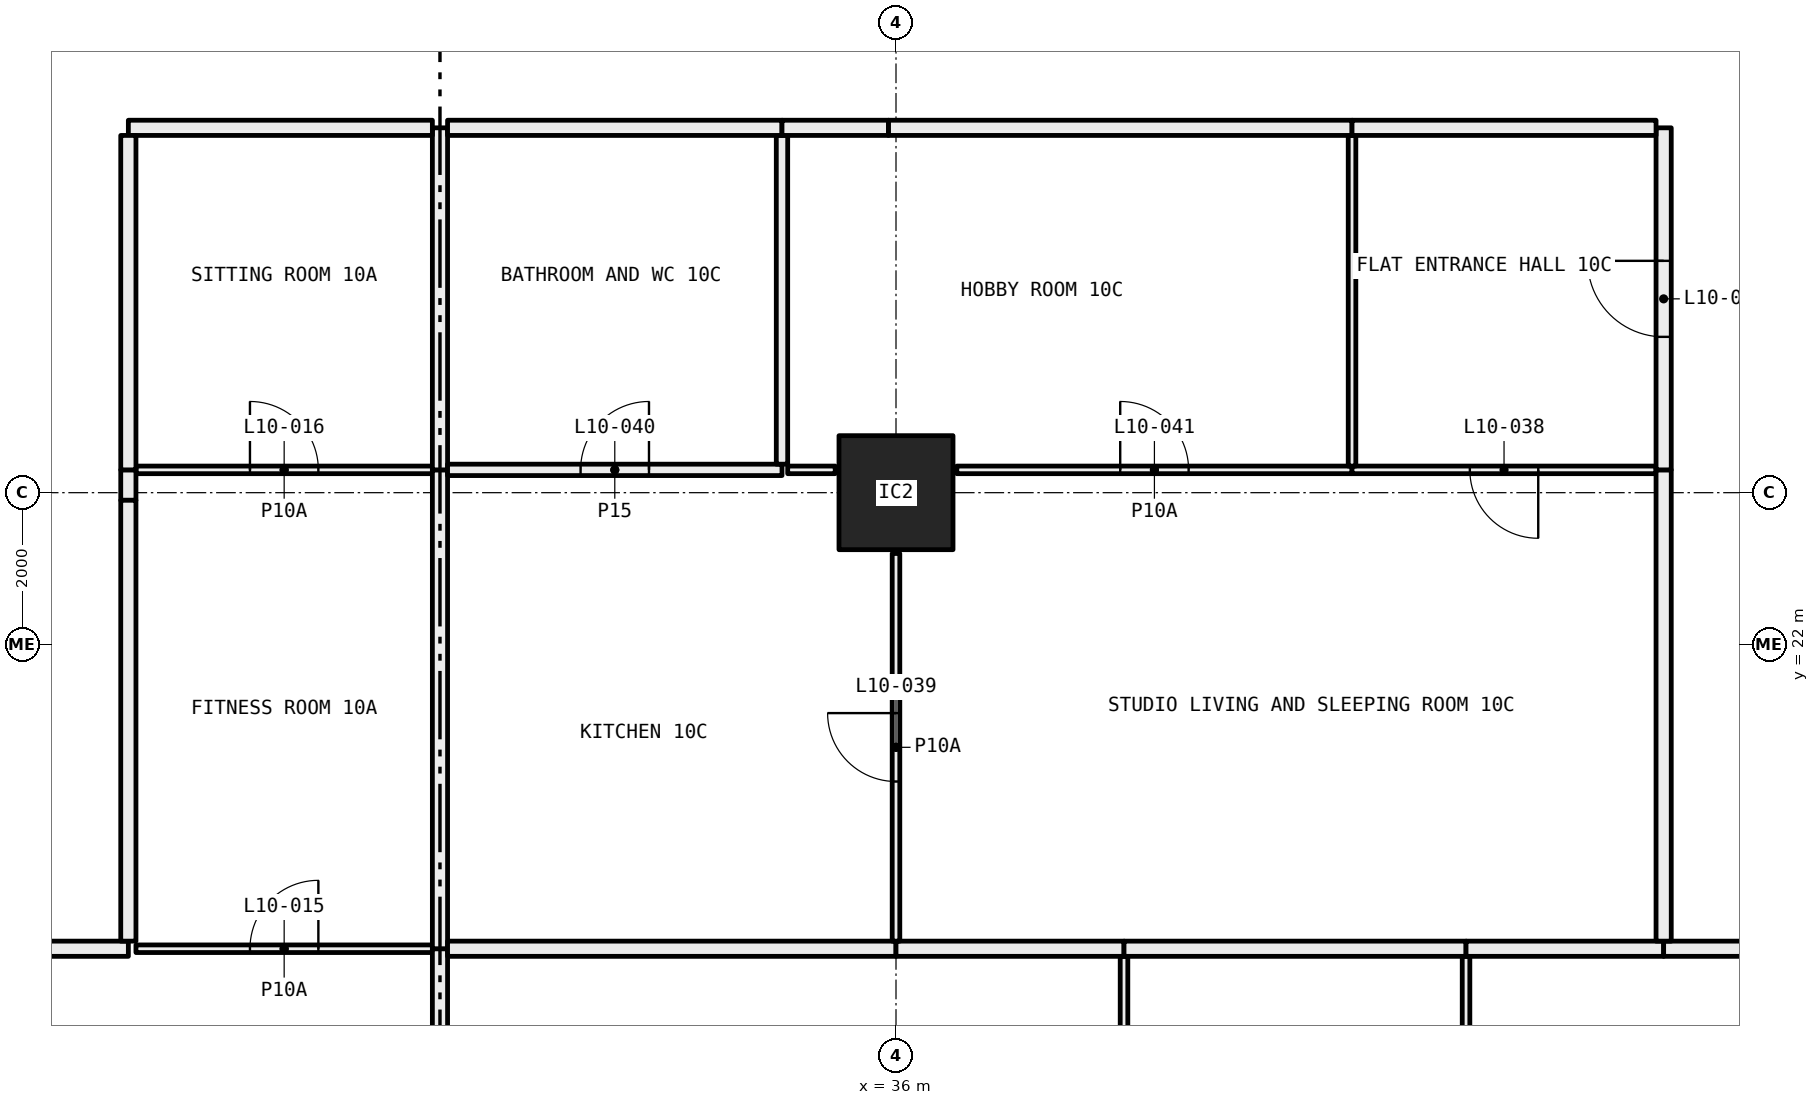
"""IFC4 building model, lengths in metres.
Left out: names, types, materials, properties, quantities, classifications, styles, units other than length and angle.
Written with IfcOpenShell. Run it as: python <this file> out.ifc"""

import sys

from ifc_helpers import new_model, si_unit, direction, frame, frame_2d, origin, origin_2d, place, context, subcontext, project, spatial, rectangle, hollow_rectangle, extrude, element, fill, save


model = new_model("IFC4")
c1 = context("Model", 3, precision=1e-05, world=origin(), true_north=direction((0.0, 1.0)))
c2 = subcontext(c1, "Body", "Model", "MODEL_VIEW")
j1 = project(units=[si_unit("LENGTHUNIT", "METRE"), si_unit("PLANEANGLEUNIT", "RADIAN")], contexts=[c1])
p1 = place(None, origin())
s1 = spatial("IfcSite", under=j1, at=p1, CompositionType="ELEMENT")
p2 = place(p1, origin())
s2 = spatial("IfcBuilding", under=s1, at=p2, CompositionType="ELEMENT")
p3 = place(p2, frame((0.0, 0.0, 47.25)))
s3 = spatial("IfcBuildingStorey", under=s2, at=p3, CompositionType="ELEMENT", Elevation=47.25)
p4 = place(p3, frame((36.0, 24.0, 0.0), z_axis=(0.0, 0.0, 1.0), x_axis=(1.0, 0.0, 0.0)))
e1 = element("IfcColumn", 1, at=p4, inside=s3, PredefinedType="COLUMN", context=c2, shape_type="SweptSolid", body=[
    extrude(hollow_rectangle(XDim=1.5, YDim=1.5, WallThickness=0.065, at=origin_2d()), origin(), (0.0, 0.0, 1.0), 3.05),
])
p5 = place(p3, frame((29.9, 18.0, 0.0), z_axis=(0.0, 0.0, 1.0), x_axis=(-1.0, 0.0, 0.0)))
e2 = element("IfcWall", 2, at=p5, inside=s3, PredefinedType="PARTITIONING", context=c2, shape_type="SweptSolid", body=[
    extrude(rectangle(XDim=3.9, YDim=0.1, at=frame_2d((1.95, 0.0))), origin(), (0.0, 0.0, 1.0), 3.05),
])
p6 = place(p5, frame((1.5, 0.0, 0.0)))
e3 = element("IfcOpeningElement", 3, at=p6, cuts=e2, PredefinedType="OPENING", context=c2, shape_type="SweptSolid", body=[
    extrude(rectangle(XDim=0.9, YDim=2.1, at=frame_2d((0.45, 1.05))), frame((0.0, 0.06, 0.0), z_axis=(0.0, -1.0, 0.0), x_axis=(1.0, 0.0, 0.0)), (0.0, 0.0, 1.0), 0.12),
])
p7 = place(p3, frame((30.0, 12.0, 0.0), z_axis=(0.0, 0.0, 1.0), x_axis=(0.0, 1.0, 0.0)))
e4 = element("IfcWall", 4, at=p7, inside=s3, PredefinedType="PARTITIONING", context=c2, shape_type="SweptSolid", body=[
    extrude(rectangle(XDim=6.0, YDim=0.2, at=frame_2d((3.0, 0.0))), origin(), (0.0, 0.0, 1.0), 2.45),
])
p8 = place(p3, frame((25.9, 18.0, 0.0), z_axis=(0.0, 0.0, 1.0), x_axis=(-1.0, 0.0, 0.0)))
e5 = element("IfcWall", 5, at=p8, inside=s3, PredefinedType="PARTITIONING", context=c2, shape_type="SweptSolid", body=[
    extrude(rectangle(XDim=1.9, YDim=0.2, at=frame_2d((0.95, 0.0))), origin(), (0.0, 0.0, 1.0), 3.05),
])
p9 = place(p3, frame((29.9, 24.3, 0.0), z_axis=(0.0, 0.0, 1.0), x_axis=(-1.0, 0.0, 0.0)))
e6 = element("IfcWall", 6, at=p9, inside=s3, PredefinedType="PARTITIONING", context=c2, shape_type="SweptSolid", body=[
    extrude(rectangle(XDim=3.9, YDim=0.1, at=frame_2d((1.95, 0.0))), origin(), (0.0, 0.0, 1.0), 3.05),
])
p10 = place(p9, frame((1.5, 0.0, 0.0)))
e7 = element("IfcOpeningElement", 7, at=p10, cuts=e6, PredefinedType="OPENING", context=c2, shape_type="SweptSolid", body=[
    extrude(rectangle(XDim=0.9, YDim=2.1, at=frame_2d((0.45, 1.05))), frame((0.0, 0.06, 0.0), z_axis=(0.0, -1.0, 0.0), x_axis=(1.0, 0.0, 0.0)), (0.0, 0.0, 1.0), 0.12),
])
p11 = place(p3, frame((30.0, 18.0, 0.0), z_axis=(0.0, 0.0, 1.0), x_axis=(0.0, 1.0, 0.0)))
e8 = element("IfcWall", 8, at=p11, inside=s3, PredefinedType="PARTITIONING", context=c2, shape_type="SweptSolid", body=[
    extrude(rectangle(XDim=6.3, YDim=0.2, at=frame_2d((3.15, 0.0))), origin(), (0.0, 0.0, 1.0), 2.45),
])
p12 = place(p3, frame((25.9, 24.3, 0.0), z_axis=(0.0, 0.0, 1.0), x_axis=(0.0, -1.0, 0.0)))
e9 = element("IfcWall", 9, at=p12, inside=s3, PredefinedType="PARTITIONING", context=c2, shape_type="SweptSolid", body=[
    extrude(rectangle(XDim=0.4, YDim=0.2, at=frame_2d((0.2, 0.0))), origin(), (0.0, 0.0, 1.0), 2.45),
])
p13 = place(p3, frame((25.9, 23.9, 0.0), z_axis=(0.0, 0.0, 1.0), x_axis=(0.0, -1.0, 0.0)))
e10 = element("IfcWall", 10, at=p13, inside=s3, PredefinedType="PARTITIONING", context=c2, shape_type="SweptSolid", body=[
    extrude(rectangle(XDim=5.8, YDim=0.2, at=frame_2d((2.9, 0.0))), origin(), (0.0, 0.0, 1.0), 3.05),
])
p14 = place(p3, frame((30.0, 24.3, 0.0), z_axis=(0.0, 0.0, 1.0), x_axis=(0.0, 1.0, 0.0)))
e11 = element("IfcWall", 11, at=p14, inside=s3, PredefinedType="PARTITIONING", context=c2, shape_type="SweptSolid", body=[
    extrude(rectangle(XDim=4.5, YDim=0.2, at=frame_2d((2.25, 0.0))), origin(), (0.0, 0.0, 1.0), 3.05),
])
p15 = place(p3, frame((29.9, 28.8, 0.0), z_axis=(0.0, 0.0, 1.0), x_axis=(-1.0, 0.0, 0.0)))
e12 = element("IfcWall", 12, at=p15, inside=s3, PredefinedType="PARTITIONING", context=c2, shape_type="SweptSolid", body=[
    extrude(rectangle(XDim=4.0, YDim=0.2, at=frame_2d((2.0, 0.0))), origin(), (0.0, 0.0, 1.0), 3.05),
])
p16 = place(p3, frame((25.9, 28.7, 0.0), z_axis=(0.0, 0.0, 1.0), x_axis=(0.0, -1.0, 0.0)))
e13 = element("IfcWall", 13, at=p16, inside=s3, PredefinedType="PARTITIONING", context=c2, shape_type="SweptSolid", body=[
    extrude(rectangle(XDim=4.4, YDim=0.2, at=frame_2d((2.2, 0.0))), origin(), (0.0, 0.0, 1.0), 3.05),
])
p17 = place(p3, frame((39.0, 12.05, 0.0), z_axis=(0.0, 0.0, 1.0), x_axis=(0.0, 1.0, 0.0)))
e14 = element("IfcWall", 14, at=p17, inside=s3, PredefinedType="PARTITIONING", context=c2, shape_type="SweptSolid", body=[
    extrude(rectangle(XDim=5.85, YDim=0.1, at=frame_2d((2.925, 0.0))), origin(), (0.0, 0.0, 1.0), 2.45),
])
p18 = place(p3, frame((36.0, 18.0, 0.0), z_axis=(0.0, 0.0, 1.0), x_axis=(-1.0, 0.0, 0.0)))
e15 = element("IfcWall", 15, at=p18, inside=s3, PredefinedType="PARTITIONING", context=c2, shape_type="SweptSolid", body=[
    extrude(rectangle(XDim=5.9, YDim=0.2, at=frame_2d((2.95, 0.0))), origin(), (0.0, 0.0, 1.0), 2.45),
])
p19 = place(p3, frame((39.0, 18.0, 0.0), z_axis=(0.0, 0.0, 1.0), x_axis=(-1.0, 0.0, 0.0)))
e16 = element("IfcWall", 16, at=p19, inside=s3, PredefinedType="PARTITIONING", context=c2, shape_type="SweptSolid", body=[
    extrude(rectangle(XDim=3.0, YDim=0.2, at=frame_2d((1.5, 0.0))), origin(), (0.0, 0.0, 1.0), 2.45),
])
p20 = place(p3, frame((43.5, 12.05, 0.0), z_axis=(0.0, 0.0, 1.0), x_axis=(0.0, 1.0, 0.0)))
e17 = element("IfcWall", 17, at=p20, inside=s3, PredefinedType="PARTITIONING", context=c2, shape_type="SweptSolid", body=[
    extrude(rectangle(XDim=5.85, YDim=0.1, at=frame_2d((2.925, 0.0))), origin(), (0.0, 0.0, 1.0), 2.45),
])
p21 = place(p3, frame((43.5, 18.0, 0.0), z_axis=(0.0, 0.0, 1.0), x_axis=(-1.0, 0.0, 0.0)))
e18 = element("IfcWall", 18, at=p21, inside=s3, PredefinedType="PARTITIONING", context=c2, shape_type="SweptSolid", body=[
    extrude(rectangle(XDim=4.5, YDim=0.2, at=frame_2d((2.25, 0.0))), origin(), (0.0, 0.0, 1.0), 3.05),
])
p22 = place(p3, frame((46.1, 18.0, 0.0), z_axis=(0.0, 0.0, 1.0), x_axis=(-1.0, 0.0, 0.0)))
e19 = element("IfcWall", 19, at=p22, inside=s3, PredefinedType="PARTITIONING", context=c2, shape_type="SweptSolid", body=[
    extrude(rectangle(XDim=2.6, YDim=0.2, at=frame_2d((1.3, 0.0))), origin(), (0.0, 0.0, 1.0), 3.05),
])
p23 = place(p3, frame((48.0, 18.0, 0.0), z_axis=(0.0, 0.0, 1.0), x_axis=(-1.0, 0.0, 0.0)))
e20 = element("IfcWall", 20, at=p23, inside=s3, PredefinedType="PARTITIONING", context=c2, shape_type="SweptSolid", body=[
    extrude(rectangle(XDim=1.9, YDim=0.2, at=frame_2d((0.95, 0.0))), origin(), (0.0, 0.0, 1.0), 3.05),
])
p24 = place(p3, frame((36.0, 18.1, 0.0), z_axis=(0.0, 0.0, 1.0), x_axis=(0.0, 1.0, 0.0)))
e21 = element("IfcWall", 21, at=p24, inside=s3, PredefinedType="PARTITIONING", context=c2, shape_type="SweptSolid", body=[
    extrude(rectangle(XDim=5.1, YDim=0.1, at=frame_2d((2.55, 0.0))), origin(), (0.0, 0.0, 1.0), 2.45),
])
p25 = place(p24, frame((2.1, 0.0, 0.0)))
e22 = element("IfcOpeningElement", 22, at=p25, cuts=e21, PredefinedType="OPENING", context=c2, shape_type="SweptSolid", body=[
    extrude(rectangle(XDim=0.9, YDim=2.1, at=frame_2d((0.45, 1.05))), frame((0.0, 0.06, 0.0), z_axis=(0.0, -1.0, 0.0), x_axis=(1.0, 0.0, 0.0)), (0.0, 0.0, 1.0), 0.12),
])
p26 = place(p3, frame((34.5, 24.3, 0.0), z_axis=(0.0, 0.0, 1.0), x_axis=(-1.0, 0.0, 0.0)))
e23 = element("IfcWall", 23, at=p26, inside=s3, PredefinedType="PARTITIONING", context=c2, shape_type="SweptSolid", body=[
    extrude(rectangle(XDim=4.4, YDim=0.15, at=frame_2d((2.2, 0.0))), origin(), (0.0, 0.0, 1.0), 3.05),
])
p27 = place(p26, frame((1.75, 0.0, 0.0)))
e24 = element("IfcOpeningElement", 24, at=p27, cuts=e23, PredefinedType="OPENING", context=c2, shape_type="SweptSolid", body=[
    extrude(rectangle(XDim=0.9, YDim=2.1, at=frame_2d((0.45, 1.05))), frame((0.0, 0.085, 0.0), z_axis=(0.0, -1.0, 0.0), x_axis=(1.0, 0.0, 0.0)), (0.0, 0.0, 1.0), 0.17),
])
p28 = place(p3, frame((35.2, 24.3, 0.0), z_axis=(0.0, 0.0, 1.0), x_axis=(-1.0, 0.0, 0.0)))
e25 = element("IfcWall", 25, at=p28, inside=s3, PredefinedType="PARTITIONING", context=c2, shape_type="SweptSolid", body=[
    extrude(rectangle(XDim=0.625, YDim=0.1, at=frame_2d((0.312, 0.0))), origin(), (0.0, 0.0, 1.0), 3.05),
])
p29 = place(p3, frame((42.0, 24.3, 0.0), z_axis=(0.0, 0.0, 1.0), x_axis=(-1.0, 0.0, 0.0)))
e26 = element("IfcWall", 26, at=p29, inside=s3, PredefinedType="PARTITIONING", context=c2, shape_type="SweptSolid", body=[
    extrude(rectangle(XDim=5.2, YDim=0.1, at=frame_2d((2.6, 0.0))), origin(), (0.0, 0.0, 1.0), 3.05),
])
p30 = place(p29, frame((2.15, 0.0, 0.0)))
e27 = element("IfcOpeningElement", 27, at=p30, cuts=e26, PredefinedType="OPENING", context=c2, shape_type="SweptSolid", body=[
    extrude(rectangle(XDim=0.9, YDim=2.1, at=frame_2d((0.45, 1.05))), frame((0.0, 0.06, 0.0), z_axis=(0.0, -1.0, 0.0), x_axis=(1.0, 0.0, 0.0)), (0.0, 0.0, 1.0), 0.12),
])
p31 = place(p3, frame((46.0, 24.3, 0.0), z_axis=(0.0, 0.0, 1.0), x_axis=(-1.0, 0.0, 0.0)))
e28 = element("IfcWall", 28, at=p31, inside=s3, PredefinedType="PARTITIONING", context=c2, shape_type="SweptSolid", body=[
    extrude(rectangle(XDim=4.0, YDim=0.1, at=frame_2d((2.0, 0.0))), origin(), (0.0, 0.0, 1.0), 3.05),
])
p32 = place(p31, frame((1.55, 0.0, 0.0)))
e29 = element("IfcOpeningElement", 29, at=p32, cuts=e28, PredefinedType="OPENING", context=c2, shape_type="SweptSolid", body=[
    extrude(rectangle(XDim=0.9, YDim=2.1, at=frame_2d((0.45, 1.05))), frame((0.0, 0.06, 0.0), z_axis=(0.0, -1.0, 0.0), x_axis=(1.0, 0.0, 0.0)), (0.0, 0.0, 1.0), 0.12),
])
p33 = place(p3, frame((46.1, 18.1, 0.0), z_axis=(0.0, 0.0, 1.0), x_axis=(0.0, 1.0, 0.0)))
e30 = element("IfcWall", 30, at=p33, inside=s3, PredefinedType="PARTITIONING", context=c2, shape_type="SweptSolid", body=[
    extrude(rectangle(XDim=6.2, YDim=0.2, at=frame_2d((3.1, 0.0))), origin(), (0.0, 0.0, 1.0), 2.45),
])
p34 = place(p3, frame((34.5, 24.375, 0.0), z_axis=(0.0, 0.0, 1.0), x_axis=(0.0, 1.0, 0.0)))
e31 = element("IfcWall", 31, at=p34, inside=s3, PredefinedType="PARTITIONING", context=c2, shape_type="SweptSolid", body=[
    extrude(rectangle(XDim=4.325, YDim=0.15, at=frame_2d((2.163, 0.0))), origin(), (0.0, 0.0, 1.0), 3.05),
])
p35 = place(p3, frame((34.5, 28.8, 0.0), z_axis=(0.0, 0.0, 1.0), x_axis=(-1.0, 0.0, 0.0)))
e32 = element("IfcWall", 32, at=p35, inside=s3, PredefinedType="PARTITIONING", context=c2, shape_type="SweptSolid", body=[
    extrude(rectangle(XDim=4.4, YDim=0.2, at=frame_2d((2.2, 0.0))), origin(), (0.0, 0.0, 1.0), 3.05),
])
p36 = place(p3, frame((42.0, 24.35, 0.0), z_axis=(0.0, 0.0, 1.0), x_axis=(0.0, 1.0, 0.0)))
e33 = element("IfcWall", 33, at=p36, inside=s3, PredefinedType="PARTITIONING", context=c2, shape_type="SweptSolid", body=[
    extrude(rectangle(XDim=4.35, YDim=0.1, at=frame_2d((2.175, 0.0))), origin(), (0.0, 0.0, 1.0), 3.05),
])
p37 = place(p3, frame((42.0, 28.8, 0.0), z_axis=(0.0, 0.0, 1.0), x_axis=(-1.0, 0.0, 0.0)))
e34 = element("IfcWall", 34, at=p37, inside=s3, PredefinedType="PARTITIONING", context=c2, shape_type="SweptSolid", body=[
    extrude(rectangle(XDim=6.1, YDim=0.2, at=frame_2d((3.05, 0.0))), origin(), (0.0, 0.0, 1.0), 2.45),
])
p38 = place(p3, frame((35.9, 28.8, 0.0), z_axis=(0.0, 0.0, 1.0), x_axis=(-1.0, 0.0, 0.0)))
e35 = element("IfcWall", 35, at=p38, inside=s3, PredefinedType="PARTITIONING", context=c2, shape_type="SweptSolid", body=[
    extrude(rectangle(XDim=1.4, YDim=0.2, at=frame_2d((0.7, 0.0))), origin(), (0.0, 0.0, 1.0), 3.05),
])
p39 = place(p3, frame((46.1, 24.3, 0.0), z_axis=(0.0, 0.0, 1.0), x_axis=(0.0, 1.0, 0.0)))
e36 = element("IfcWall", 36, at=p39, inside=s3, PredefinedType="PARTITIONING", context=c2, shape_type="SweptSolid", body=[
    extrude(rectangle(XDim=4.5, YDim=0.2, at=frame_2d((2.25, 0.0))), origin(), (0.0, 0.0, 1.0), 3.05),
])
p40 = place(p39, frame((1.75, 0.0, 0.0)))
e37 = element("IfcOpeningElement", 37, at=p40, cuts=e36, PredefinedType="OPENING", context=c2, shape_type="SweptSolid", body=[
    extrude(rectangle(XDim=1.0, YDim=2.1, at=frame_2d((0.5, 1.05))), frame((0.0, 0.11, 0.0), z_axis=(0.0, -1.0, 0.0), x_axis=(1.0, 0.0, 0.0)), (0.0, 0.0, 1.0), 0.22),
])
p41 = place(p3, frame((46.0, 28.8, 0.0), z_axis=(0.0, 0.0, 1.0), x_axis=(-1.0, 0.0, 0.0)))
e38 = element("IfcWall", 38, at=p41, inside=s3, PredefinedType="PARTITIONING", context=c2, shape_type="SweptSolid", body=[
    extrude(rectangle(XDim=4.0, YDim=0.2, at=frame_2d((2.0, 0.0))), origin(), (0.0, 0.0, 1.0), 3.05),
])
p42 = place(p6, frame((0.9, 0.0, 0.0), x_axis=(-1.0, 0.0, 0.0)))
e39 = element("IfcDoor", 39, at=p42, inside=s3, OperationType="SINGLE_SWING_LEFT", PredefinedType="DOOR", context=c2, shape_type="SweptSolid", body=[
    extrude(rectangle(XDim=0.9, YDim=2.1, at=frame_2d((0.45, 1.05))), frame((0.0, 0.025, 0.0), z_axis=(0.0, -1.0, 0.0), x_axis=(1.0, 0.0, 0.0)), (0.0, 0.0, 1.0), 0.05),
])
fill(e3, e39)
p43 = place(p10, frame((0.9, 0.0, 0.0), x_axis=(-1.0, 0.0, 0.0)))
e40 = element("IfcDoor", 40, at=p43, inside=s3, OperationType="SINGLE_SWING_RIGHT", PredefinedType="DOOR", context=c2, shape_type="SweptSolid", body=[
    extrude(rectangle(XDim=0.9, YDim=2.1, at=frame_2d((0.45, 1.05))), frame((0.0, 0.025, 0.0), z_axis=(0.0, -1.0, 0.0), x_axis=(1.0, 0.0, 0.0)), (0.0, 0.0, 1.0), 0.05),
])
fill(e7, e40)
p44 = place(p40, origin())
e41 = element("IfcDoor", 41, at=p44, inside=s3, OperationType="SINGLE_SWING_LEFT", PredefinedType="DOOR", context=c2, shape_type="SweptSolid", body=[
    extrude(rectangle(XDim=1.0, YDim=2.1, at=frame_2d((0.5, 1.05))), frame((0.0, 0.025, 0.0), z_axis=(0.0, -1.0, 0.0), x_axis=(1.0, 0.0, 0.0)), (0.0, 0.0, 1.0), 0.05),
])
fill(e37, e41)
p45 = place(p32, origin())
e42 = element("IfcDoor", 42, at=p45, inside=s3, OperationType="SINGLE_SWING_RIGHT", PredefinedType="DOOR", context=c2, shape_type="SweptSolid", body=[
    extrude(rectangle(XDim=0.9, YDim=2.1, at=frame_2d((0.45, 1.05))), frame((0.0, 0.025, 0.0), z_axis=(0.0, -1.0, 0.0), x_axis=(1.0, 0.0, 0.0)), (0.0, 0.0, 1.0), 0.05),
])
fill(e29, e42)
p46 = place(p25, origin())
e43 = element("IfcDoor", 43, at=p46, inside=s3, OperationType="SINGLE_SWING_LEFT", PredefinedType="DOOR", context=c2, shape_type="SweptSolid", body=[
    extrude(rectangle(XDim=0.9, YDim=2.1, at=frame_2d((0.45, 1.05))), frame((0.0, 0.025, 0.0), z_axis=(0.0, -1.0, 0.0), x_axis=(1.0, 0.0, 0.0)), (0.0, 0.0, 1.0), 0.05),
])
fill(e22, e43)
p47 = place(p27, frame((0.9, 0.0, 0.0), x_axis=(-1.0, 0.0, 0.0)))
e44 = element("IfcDoor", 44, at=p47, inside=s3, OperationType="SINGLE_SWING_LEFT", PredefinedType="DOOR", context=c2, shape_type="SweptSolid", body=[
    extrude(rectangle(XDim=0.9, YDim=2.1, at=frame_2d((0.45, 1.05))), frame((0.0, 0.025, 0.0), z_axis=(0.0, -1.0, 0.0), x_axis=(1.0, 0.0, 0.0)), (0.0, 0.0, 1.0), 0.05),
])
fill(e24, e44)
p48 = place(p30, frame((0.9, 0.0, 0.0), x_axis=(-1.0, 0.0, 0.0)))
e45 = element("IfcDoor", 45, at=p48, inside=s3, OperationType="SINGLE_SWING_RIGHT", PredefinedType="DOOR", context=c2, shape_type="SweptSolid", body=[
    extrude(rectangle(XDim=0.9, YDim=2.1, at=frame_2d((0.45, 1.05))), frame((0.0, 0.025, 0.0), z_axis=(0.0, -1.0, 0.0), x_axis=(1.0, 0.0, 0.0)), (0.0, 0.0, 1.0), 0.05),
])
fill(e27, e45)
save(model, sys.argv[1])
